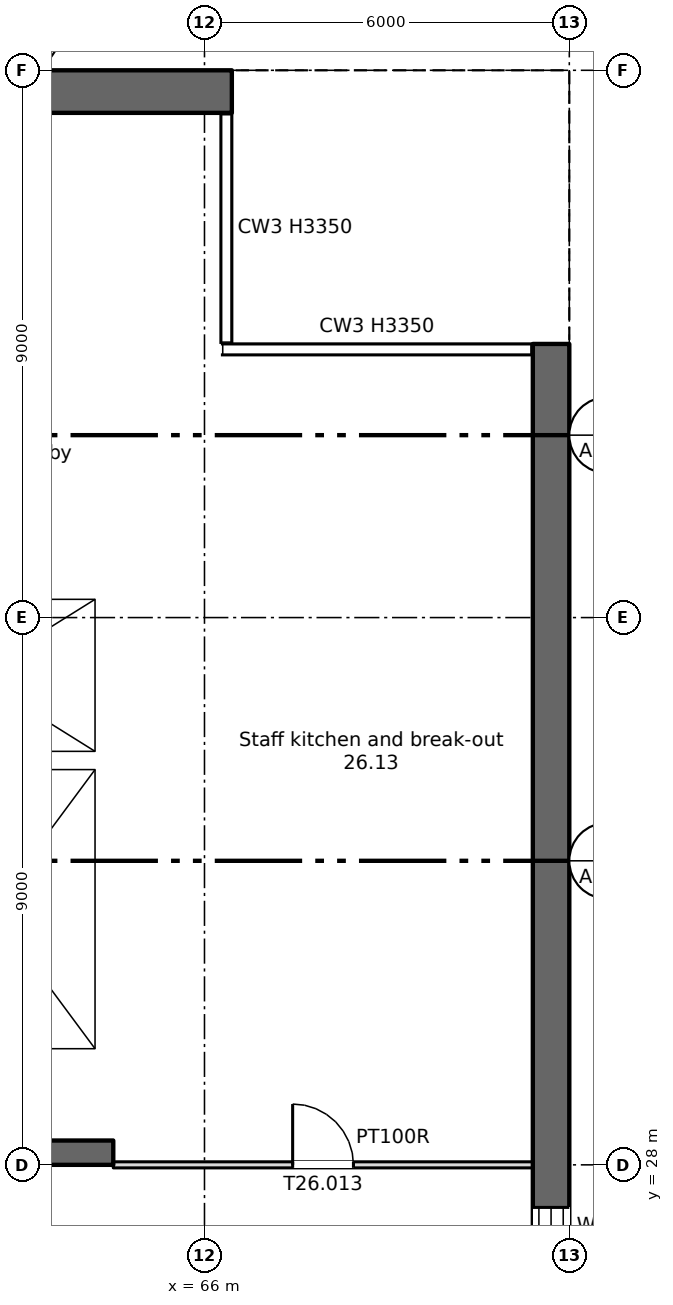
"""IFC4 building model, lengths in metres.
Left out: names, types, materials, properties, quantities, classifications, styles, units other than length and angle.
Written with IfcOpenShell. Run it as: python <this file> out.ifc"""

import sys

from ifc_helpers import new_model, si_unit, direction, frame, frame_2d, origin, place, context, subcontext, project, spatial, rectangle, extrude, element, fill, save


model = new_model("IFC4")
c1 = context("Model", 3, precision=1e-05, world=origin(), true_north=direction((0.0, 1.0)))
c2 = subcontext(c1, "Body", "Model", "MODEL_VIEW")
j1 = project(units=[si_unit("LENGTHUNIT", "METRE"), si_unit("PLANEANGLEUNIT", "RADIAN")], contexts=[c1])
p1 = place(None, origin())
s1 = spatial("IfcSite", under=j1, at=p1, CompositionType="ELEMENT")
p2 = place(p1, origin())
s2 = spatial("IfcBuilding", under=s1, at=p2, CompositionType="ELEMENT")
p3 = place(p2, frame((0.0, 0.0, 181.75)))
s3 = spatial("IfcBuildingStorey", under=s2, at=p3, CompositionType="ELEMENT", Elevation=181.75)
p4 = place(p3, frame((71.7, 7.5, 0.0), z_axis=(0.0, 0.0, 1.0), x_axis=(0.0, 1.0, 0.0)))
e1 = element("IfcWall", 1, at=p4, inside=s3, PredefinedType="SHEAR", context=c2, shape_type="SweptSolid", body=[
    extrude(rectangle(XDim=34.0, YDim=0.6, at=frame_2d((17.0, 0.0))), origin(), (0.0, 0.0, 1.0), 3.35),
])
p5 = place(p4, frame((1.2, 0.0, 0.6)))
e2 = element("IfcOpeningElement", 2, at=p5, cuts=e1, PredefinedType="OPENING", context=c2, shape_type="SweptSolid", body=[
    extrude(rectangle(XDim=0.6, YDim=2.4, at=frame_2d((0.3, 1.2))), frame((0.0, 0.31, 0.0), z_axis=(0.0, -1.0, 0.0), x_axis=(1.0, 0.0, 0.0)), (0.0, 0.0, 1.0), 0.62),
])
p6 = place(p4, frame((7.2, 0.0, 0.6)))
e3 = element("IfcOpeningElement", 3, at=p6, cuts=e1, PredefinedType="OPENING", context=c2, shape_type="SweptSolid", body=[
    extrude(rectangle(XDim=0.6, YDim=2.4, at=frame_2d((0.3, 1.2))), frame((0.0, 0.31, 0.0), z_axis=(0.0, -1.0, 0.0), x_axis=(1.0, 0.0, 0.0)), (0.0, 0.0, 1.0), 0.62),
])
p7 = place(p4, frame((13.2, 0.0, 0.6)))
e4 = element("IfcOpeningElement", 4, at=p7, cuts=e1, PredefinedType="OPENING", context=c2, shape_type="SweptSolid", body=[
    extrude(rectangle(XDim=0.6, YDim=2.4, at=frame_2d((0.3, 1.2))), frame((0.0, 0.31, 0.0), z_axis=(0.0, -1.0, 0.0), x_axis=(1.0, 0.0, 0.0)), (0.0, 0.0, 1.0), 0.62),
])
p8 = place(p4, frame((19.2, 0.0, 0.6)))
e5 = element("IfcOpeningElement", 5, at=p8, cuts=e1, PredefinedType="OPENING", context=c2, shape_type="SweptSolid", body=[
    extrude(rectangle(XDim=0.6, YDim=2.4, at=frame_2d((0.3, 1.2))), frame((0.0, 0.31, 0.0), z_axis=(0.0, -1.0, 0.0), x_axis=(1.0, 0.0, 0.0)), (0.0, 0.0, 1.0), 0.62),
])
p9 = place(p3, frame((11.55, 45.65, 0.0), z_axis=(0.0, 0.0, 1.0), x_axis=(1.0, 0.0, 0.0)))
e6 = element("IfcWall", 6, at=p9, inside=s3, PredefinedType="SHEAR", context=c2, shape_type="SweptSolid", body=[
    extrude(rectangle(XDim=54.9, YDim=0.7, at=frame_2d((27.45, 0.0))), origin(), (0.0, 0.0, 1.0), 3.35),
])
p10 = place(p9, frame((1.2, 0.0, 0.6)))
e7 = element("IfcOpeningElement", 7, at=p10, cuts=e6, PredefinedType="OPENING", context=c2, shape_type="SweptSolid", body=[
    extrude(rectangle(XDim=0.6, YDim=2.4, at=frame_2d((0.3, 1.2))), frame((0.0, 0.36, 0.0), z_axis=(0.0, -1.0, 0.0), x_axis=(1.0, 0.0, 0.0)), (0.0, 0.0, 1.0), 0.72),
])
p11 = place(p9, frame((49.2, 0.0, 0.6)))
e8 = element("IfcOpeningElement", 8, at=p11, cuts=e6, PredefinedType="OPENING", context=c2, shape_type="SweptSolid", body=[
    extrude(rectangle(XDim=0.6, YDim=2.4, at=frame_2d((0.3, 1.2))), frame((0.0, 0.36, 0.0), z_axis=(0.0, -1.0, 0.0), x_axis=(1.0, 0.0, 0.0)), (0.0, 0.0, 1.0), 0.72),
])
p12 = place(p3, frame((6.6, 28.2, 0.0), z_axis=(0.0, 0.0, 1.0), x_axis=(1.0, 0.0, 0.0)))
e9 = element("IfcWall", 9, at=p12, inside=s3, PredefinedType="SHEAR", context=c2, shape_type="SweptSolid", body=[
    extrude(rectangle(XDim=57.9, YDim=0.4, at=frame_2d((28.95, 0.0))), origin(), (0.0, 0.0, 1.0), 3.35),
])
p13 = place(p12, frame((12.913, 0.0, 0.0)))
e10 = element("IfcOpeningElement", 10, at=p13, cuts=e9, PredefinedType="OPENING", context=c2, shape_type="SweptSolid", body=[
    extrude(rectangle(XDim=0.9, YDim=2.1, at=frame_2d((0.45, 1.05))), frame((0.0, 0.21, 0.0), z_axis=(0.0, -1.0, 0.0), x_axis=(1.0, 0.0, 0.0)), (0.0, 0.0, 1.0), 0.42),
])
p14 = place(p12, frame((15.488, 0.0, 0.0)))
e11 = element("IfcOpeningElement", 11, at=p14, cuts=e9, PredefinedType="OPENING", context=c2, shape_type="SweptSolid", body=[
    extrude(rectangle(XDim=0.9, YDim=2.1, at=frame_2d((0.45, 1.05))), frame((0.0, 0.21, 0.0), z_axis=(0.0, -1.0, 0.0), x_axis=(1.0, 0.0, 0.0)), (0.0, 0.0, 1.0), 0.42),
])
p15 = place(p12, frame((48.413, 0.0, 0.0)))
e12 = element("IfcOpeningElement", 12, at=p15, cuts=e9, PredefinedType="OPENING", context=c2, shape_type="SweptSolid", body=[
    extrude(rectangle(XDim=0.9, YDim=2.1, at=frame_2d((0.45, 1.05))), frame((0.0, 0.21, 0.0), z_axis=(0.0, -1.0, 0.0), x_axis=(1.0, 0.0, 0.0)), (0.0, 0.0, 1.0), 0.42),
])
p16 = place(p12, frame((50.988, 0.0, 0.0)))
e13 = element("IfcOpeningElement", 13, at=p16, cuts=e9, PredefinedType="OPENING", context=c2, shape_type="SweptSolid", body=[
    extrude(rectangle(XDim=0.9, YDim=2.1, at=frame_2d((0.45, 1.05))), frame((0.0, 0.21, 0.0), z_axis=(0.0, -1.0, 0.0), x_axis=(1.0, 0.0, 0.0)), (0.0, 0.0, 1.0), 0.42),
])
p17 = place(p12, frame((0.663, 0.0, 0.0)))
e14 = element("IfcOpeningElement", 14, at=p17, cuts=e9, PredefinedType="OPENING", context=c2, shape_type="SweptSolid", body=[
    extrude(rectangle(XDim=0.9, YDim=2.1, at=frame_2d((0.45, 1.05))), frame((0.0, 0.21, 0.0), z_axis=(0.0, -1.0, 0.0), x_axis=(1.0, 0.0, 0.0)), (0.0, 0.0, 1.0), 0.42),
])
p18 = place(p12, frame((2.238, 0.0, 0.0)))
e15 = element("IfcOpeningElement", 15, at=p18, cuts=e9, PredefinedType="OPENING", context=c2, shape_type="SweptSolid", body=[
    extrude(rectangle(XDim=0.9, YDim=2.1, at=frame_2d((0.45, 1.05))), frame((0.0, 0.21, 0.0), z_axis=(0.0, -1.0, 0.0), x_axis=(1.0, 0.0, 0.0)), (0.0, 0.0, 1.0), 0.42),
])
p19 = place(p12, frame((4.8, 0.0, 0.0)))
e16 = element("IfcOpeningElement", 16, at=p19, cuts=e9, PredefinedType="OPENING", context=c2, shape_type="SweptSolid", body=[
    extrude(rectangle(XDim=1.2, YDim=2.1, at=frame_2d((0.6, 1.05))), frame((0.0, 0.21, 0.0), z_axis=(0.0, -1.0, 0.0), x_axis=(1.0, 0.0, 0.0)), (0.0, 0.0, 1.0), 0.42),
])
p20 = place(p12, frame((31.8, 0.0, 0.0)))
e17 = element("IfcOpeningElement", 17, at=p20, cuts=e9, PredefinedType="OPENING", context=c2, shape_type="SweptSolid", body=[
    extrude(rectangle(XDim=1.2, YDim=2.1, at=frame_2d((0.6, 1.05))), frame((0.0, 0.21, 0.0), z_axis=(0.0, -1.0, 0.0), x_axis=(1.0, 0.0, 0.0)), (0.0, 0.0, 1.0), 0.42),
])
p21 = place(p12, frame((55.3, 0.0, 0.0)))
e18 = element("IfcOpeningElement", 18, at=p21, cuts=e9, PredefinedType="OPENING", context=c2, shape_type="SweptSolid", body=[
    extrude(rectangle(XDim=1.2, YDim=2.1, at=frame_2d((0.6, 1.05))), frame((0.0, 0.21, 0.0), z_axis=(0.0, -1.0, 0.0), x_axis=(1.0, 0.0, 0.0)), (0.0, 0.0, 1.0), 0.42),
])
p22 = place(p12, frame((21.8, 0.0, 0.0)))
e19 = element("IfcOpeningElement", 19, at=p22, cuts=e9, PredefinedType="OPENING", context=c2, shape_type="SweptSolid", body=[
    extrude(rectangle(XDim=1.2, YDim=2.1, at=frame_2d((0.6, 1.05))), frame((0.0, 0.21, 0.0), z_axis=(0.0, -1.0, 0.0), x_axis=(1.0, 0.0, 0.0)), (0.0, 0.0, 1.0), 0.42),
])
p23 = place(p12, frame((41.8, 0.0, 0.0)))
e20 = element("IfcOpeningElement", 20, at=p23, cuts=e9, PredefinedType="OPENING", context=c2, shape_type="SweptSolid", body=[
    extrude(rectangle(XDim=1.2, YDim=2.1, at=frame_2d((0.6, 1.05))), frame((0.0, 0.21, 0.0), z_axis=(0.0, -1.0, 0.0), x_axis=(1.0, 0.0, 0.0)), (0.0, 0.0, 1.0), 0.42),
])
p24 = place(p12, frame((24.95, 0.0, 0.0)))
e21 = element("IfcOpeningElement", 21, at=p24, cuts=e9, PredefinedType="OPENING", context=c2, shape_type="SweptSolid", body=[
    extrude(rectangle(XDim=2.4, YDim=2.1, at=frame_2d((1.2, 1.05))), frame((0.0, 0.21, 0.0), z_axis=(0.0, -1.0, 0.0), x_axis=(1.0, 0.0, 0.0)), (0.0, 0.0, 1.0), 0.42),
])
p25 = place(p12, frame((37.45, 0.0, 0.0)))
e22 = element("IfcOpeningElement", 22, at=p25, cuts=e9, PredefinedType="OPENING", context=c2, shape_type="SweptSolid", body=[
    extrude(rectangle(XDim=2.4, YDim=2.1, at=frame_2d((1.2, 1.05))), frame((0.0, 0.21, 0.0), z_axis=(0.0, -1.0, 0.0), x_axis=(1.0, 0.0, 0.0)), (0.0, 0.0, 1.0), 0.42),
])
p26 = place(p12, frame((8.1, 0.0, 0.0)))
e23 = element("IfcOpeningElement", 23, at=p26, cuts=e9, PredefinedType="OPENING", context=c2, shape_type="SweptSolid", body=[
    extrude(rectangle(XDim=2.4, YDim=2.1, at=frame_2d((1.2, 1.05))), frame((0.0, 0.21, 0.0), z_axis=(0.0, -1.0, 0.0), x_axis=(1.0, 0.0, 0.0)), (0.0, 0.0, 1.0), 0.42),
])
p27 = place(p12, frame((28.95, 0.0, 0.0)))
e24 = element("IfcOpeningElement", 24, at=p27, cuts=e9, PredefinedType="OPENING", context=c2, shape_type="SweptSolid", body=[
    extrude(rectangle(XDim=0.9, YDim=2.1, at=frame_2d((0.45, 1.05))), frame((0.0, 0.21, 0.0), z_axis=(0.0, -1.0, 0.0), x_axis=(1.0, 0.0, 0.0)), (0.0, 0.0, 1.0), 0.42),
])
p28 = place(p12, frame((34.95, 0.0, 0.0)))
e25 = element("IfcOpeningElement", 25, at=p28, cuts=e9, PredefinedType="OPENING", context=c2, shape_type="SweptSolid", body=[
    extrude(rectangle(XDim=0.9, YDim=2.1, at=frame_2d((0.45, 1.05))), frame((0.0, 0.21, 0.0), z_axis=(0.0, -1.0, 0.0), x_axis=(1.0, 0.0, 0.0)), (0.0, 0.0, 1.0), 0.42),
])
p29 = place(p3, frame((64.35, 34.8, 0.0), z_axis=(0.0, 0.0, 1.0), x_axis=(0.0, 1.0, 0.0)))
e26 = element("IfcWall", 26, at=p29, inside=s3, PredefinedType="SHEAR", context=c2, shape_type="SweptSolid", body=[
    extrude(rectangle(XDim=10.5, YDim=0.3, at=frame_2d((5.25, 0.0))), origin(), (0.0, 0.0, 1.0), 3.35),
])
p30 = place(p3, frame((64.35, 28.4, 0.0), z_axis=(0.0, 0.0, 1.0), x_axis=(0.0, 1.0, 0.0)))
e27 = element("IfcWall", 27, at=p30, inside=s3, PredefinedType="SHEAR", context=c2, shape_type="SweptSolid", body=[
    extrude(rectangle(XDim=6.1, YDim=0.3, at=frame_2d((3.05, 0.0))), origin(), (0.0, 0.0, 1.0), 3.35),
])
p31 = place(p3, frame((60.2, 34.65, 0.0), z_axis=(0.0, 0.0, 1.0), x_axis=(1.0, 0.0, 0.0)))
e28 = element("IfcWall", 28, at=p31, inside=s3, PredefinedType="SHEAR", context=c2, shape_type="SweptSolid", body=[
    extrude(rectangle(XDim=4.3, YDim=0.3, at=frame_2d((2.15, 0.0))), origin(), (0.0, 0.0, 1.0), 3.35),
])
p32 = place(p3, frame((60.2, 37.45, 0.0), z_axis=(0.0, 0.0, 1.0), x_axis=(1.0, 0.0, 0.0)))
e29 = element("IfcWall", 29, at=p32, inside=s3, PredefinedType="SHEAR", context=c2, shape_type="SweptSolid", body=[
    extrude(rectangle(XDim=4.0, YDim=0.3, at=frame_2d((2.0, 0.0))), origin(), (0.0, 0.0, 1.0), 3.35),
])
p33 = place(p32, frame((1.45, 0.0, 0.0)))
e30 = element("IfcOpeningElement", 30, at=p33, cuts=e29, PredefinedType="OPENING", context=c2, shape_type="SweptSolid", body=[
    extrude(rectangle(XDim=1.1, YDim=2.1, at=frame_2d((0.55, 1.05))), frame((0.0, 0.16, 0.0), z_axis=(0.0, -1.0, 0.0), x_axis=(1.0, 0.0, 0.0)), (0.0, 0.0, 1.0), 0.32),
])
p34 = place(p3, frame((64.5, 28.0, 0.0), z_axis=(0.0, 0.0, 1.0), x_axis=(1.0, 0.0, 0.0)))
e31 = element("IfcWall", 31, at=p34, inside=s3, PredefinedType="PARTITIONING", context=c2, shape_type="SweptSolid", body=[
    extrude(rectangle(XDim=6.9, YDim=0.1, at=frame_2d((3.45, 0.0))), origin(), (0.0, 0.0, 1.0), 3.35),
])
p35 = place(p34, frame((2.95, 0.0, 0.0)))
e32 = element("IfcOpeningElement", 32, at=p35, cuts=e31, PredefinedType="OPENING", context=c2, shape_type="SweptSolid", body=[
    extrude(rectangle(XDim=1.0, YDim=2.1, at=frame_2d((0.5, 1.05))), frame((0.0, 0.06, 0.0), z_axis=(0.0, -1.0, 0.0), x_axis=(1.0, 0.0, 0.0)), (0.0, 0.0, 1.0), 0.12),
])
p36 = place(p8, origin())
e33 = element("IfcWindow", 33, at=p36, inside=s3, PartitioningType="SINGLE_PANEL", PredefinedType="WINDOW", context=c2, shape_type="SweptSolid", body=[
    extrude(rectangle(XDim=0.6, YDim=2.4, at=frame_2d((0.3, 1.2))), frame((0.0, 0.03, 0.0), z_axis=(0.0, -1.0, 0.0), x_axis=(1.0, 0.0, 0.0)), (0.0, 0.0, 1.0), 0.06),
])
fill(e5, e33)
p37 = place(p35, origin())
e34 = element("IfcDoor", 34, at=p37, inside=s3, OperationType="SINGLE_SWING_LEFT", PredefinedType="DOOR", context=c2, shape_type="SweptSolid", body=[
    extrude(rectangle(XDim=1.0, YDim=2.1, at=frame_2d((0.5, 1.05))), frame((0.0, 0.025, 0.0), z_axis=(0.0, -1.0, 0.0), x_axis=(1.0, 0.0, 0.0)), (0.0, 0.0, 1.0), 0.05),
])
fill(e32, e34)
save(model, sys.argv[1])
